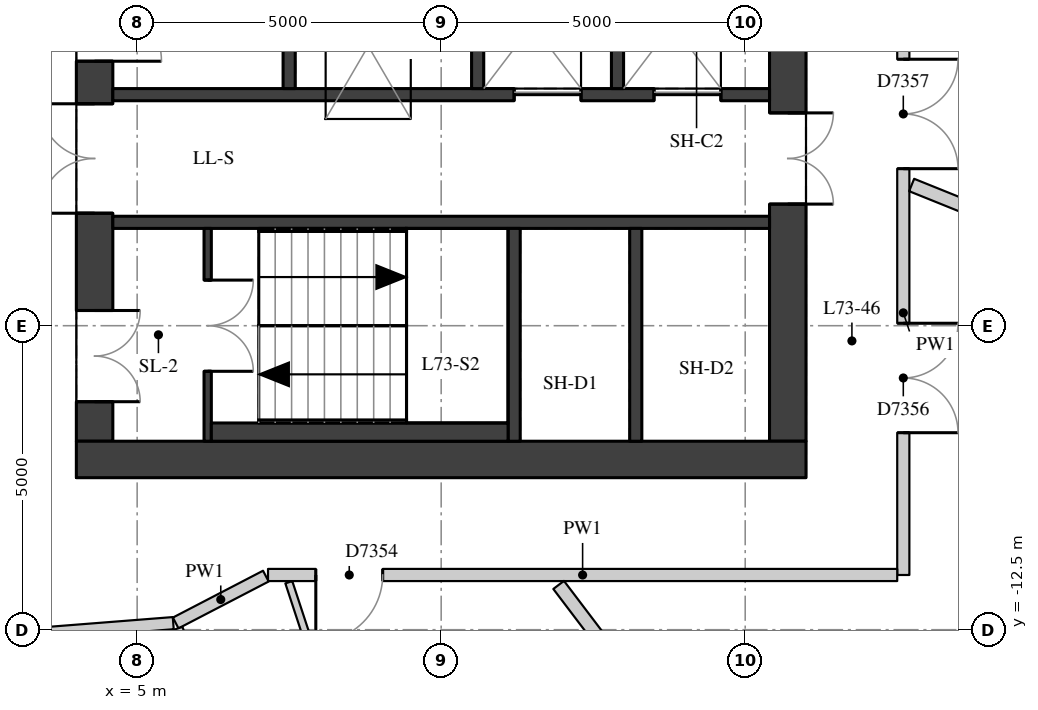
"""IFC4 building model, lengths in metres.
Left out: names, types, materials, properties, quantities, classifications, styles, units other than length and angle.
Written with IfcOpenShell. Run it as: python <this file> out.ifc"""

import sys

from ifc_helpers import new_model, si_unit, direction, frame, frame_2d, origin, place, context, subcontext, project, spatial, rectangle, extrude, element, fill, save


model = new_model("IFC4")
c1 = context("Model", 3, precision=1e-05, world=origin(), true_north=direction((0.0, 1.0)))
c2 = subcontext(c1, "Body", "Model", "MODEL_VIEW")
j1 = project(units=[si_unit("LENGTHUNIT", "METRE"), si_unit("PLANEANGLEUNIT", "RADIAN")], contexts=[c1])
p1 = place(None, origin())
s1 = spatial("IfcSite", under=j1, at=p1, CompositionType="ELEMENT")
p2 = place(p1, origin())
s2 = spatial("IfcBuilding", under=s1, at=p2, CompositionType="ELEMENT")
p3 = place(p2, frame((0.0, 0.0, 256.4)))
s3 = spatial("IfcBuildingStorey", under=s2, at=p3, CompositionType="ELEMENT", Elevation=256.4)
p4 = place(p3, frame((4.3, -9.4, 0.0), z_axis=(0.0, 0.0, 1.0), x_axis=(0.0, 1.0, 0.0)))
e1 = element("IfcWall", 1, at=p4, inside=s3, PredefinedType="SHEAR", context=c2, shape_type="SweptSolid", body=[
    extrude(rectangle(XDim=18.8, YDim=0.6, at=frame_2d((9.4, 0.0))), origin(), (0.0, 0.0, 1.0), 2.95),
])
p5 = place(p4, frame((0.65, 0.0, 0.0)))
e2 = element("IfcOpeningElement", 2, at=p5, cuts=e1, PredefinedType="OPENING", context=c2, shape_type="SweptSolid", body=[
    extrude(rectangle(XDim=1.5, YDim=2.1, at=frame_2d((0.75, 1.05))), frame((0.0, 0.31, 0.0), z_axis=(0.0, -1.0, 0.0), x_axis=(1.0, 0.0, 0.0)), (0.0, 0.0, 1.0), 0.62),
])
p6 = place(p4, frame((3.75, 0.0, 0.0)))
e3 = element("IfcOpeningElement", 3, at=p6, cuts=e1, PredefinedType="OPENING", context=c2, shape_type="SweptSolid", body=[
    extrude(rectangle(XDim=1.8, YDim=2.1, at=frame_2d((0.9, 1.05))), frame((0.0, 0.31, 0.0), z_axis=(0.0, -1.0, 0.0), x_axis=(1.0, 0.0, 0.0)), (0.0, 0.0, 1.0), 0.62),
])
p7 = place(p4, frame((6.25, 0.0, 0.0)))
e4 = element("IfcOpeningElement", 4, at=p7, cuts=e1, PredefinedType="OPENING", context=c2, shape_type="SweptSolid", body=[
    extrude(rectangle(XDim=1.1, YDim=2.1, at=frame_2d((0.55, 1.05))), frame((0.0, 0.31, 0.0), z_axis=(0.0, -1.0, 0.0), x_axis=(1.0, 0.0, 0.0)), (0.0, 0.0, 1.0), 0.62),
])
p8 = place(p4, frame((8.9, 0.0, 0.0)))
e5 = element("IfcOpeningElement", 5, at=p8, cuts=e1, PredefinedType="OPENING", context=c2, shape_type="SweptSolid", body=[
    extrude(rectangle(XDim=1.0, YDim=2.1, at=frame_2d((0.5, 1.05))), frame((0.0, 0.31, 0.0), z_axis=(0.0, -1.0, 0.0), x_axis=(1.0, 0.0, 0.0)), (0.0, 0.0, 1.0), 0.62),
])
p9 = place(p4, frame((11.45, 0.0, 0.0)))
e6 = element("IfcOpeningElement", 6, at=p9, cuts=e1, PredefinedType="OPENING", context=c2, shape_type="SweptSolid", body=[
    extrude(rectangle(XDim=1.1, YDim=2.1, at=frame_2d((0.55, 1.05))), frame((0.0, 0.31, 0.0), z_axis=(0.0, -1.0, 0.0), x_axis=(1.0, 0.0, 0.0)), (0.0, 0.0, 1.0), 0.62),
])
p10 = place(p4, frame((13.25, 0.0, 0.0)))
e7 = element("IfcOpeningElement", 7, at=p10, cuts=e1, PredefinedType="OPENING", context=c2, shape_type="SweptSolid", body=[
    extrude(rectangle(XDim=1.8, YDim=2.1, at=frame_2d((0.9, 1.05))), frame((0.0, 0.31, 0.0), z_axis=(0.0, -1.0, 0.0), x_axis=(1.0, 0.0, 0.0)), (0.0, 0.0, 1.0), 0.62),
])
p11 = place(p4, frame((16.65, 0.0, 0.0)))
e8 = element("IfcOpeningElement", 8, at=p11, cuts=e1, PredefinedType="OPENING", context=c2, shape_type="SweptSolid", body=[
    extrude(rectangle(XDim=1.5, YDim=2.1, at=frame_2d((0.75, 1.05))), frame((0.0, 0.31, 0.0), z_axis=(0.0, -1.0, 0.0), x_axis=(1.0, 0.0, 0.0)), (0.0, 0.0, 1.0), 0.62),
])
p12 = place(p3, frame((15.7, -9.4, 0.0), z_axis=(0.0, 0.0, 1.0), x_axis=(0.0, 1.0, 0.0)))
e9 = element("IfcWall", 9, at=p12, inside=s3, PredefinedType="SHEAR", context=c2, shape_type="SweptSolid", body=[
    extrude(rectangle(XDim=18.8, YDim=0.6, at=frame_2d((9.4, 0.0))), origin(), (0.0, 0.0, 1.0), 2.95),
])
p13 = place(p12, frame((13.4, 0.0, 0.0)))
e10 = element("IfcOpeningElement", 10, at=p13, cuts=e9, PredefinedType="OPENING", context=c2, shape_type="SweptSolid", body=[
    extrude(rectangle(XDim=1.5, YDim=2.1, at=frame_2d((0.75, 1.05))), frame((0.0, 0.31, 0.0), z_axis=(0.0, -1.0, 0.0), x_axis=(1.0, 0.0, 0.0)), (0.0, 0.0, 1.0), 0.62),
])
p14 = place(p12, frame((3.9, 0.0, 0.0)))
e11 = element("IfcOpeningElement", 11, at=p14, cuts=e9, PredefinedType="OPENING", context=c2, shape_type="SweptSolid", body=[
    extrude(rectangle(XDim=1.5, YDim=2.1, at=frame_2d((0.75, 1.05))), frame((0.0, 0.31, 0.0), z_axis=(0.0, -1.0, 0.0), x_axis=(1.0, 0.0, 0.0)), (0.0, 0.0, 1.0), 0.62),
])
p15 = place(p3, frame((4.0, -9.7, 0.0), z_axis=(0.0, 0.0, 1.0), x_axis=(1.0, 0.0, 0.0)))
e12 = element("IfcWall", 12, at=p15, inside=s3, PredefinedType="SHEAR", context=c2, shape_type="SweptSolid", body=[
    extrude(rectangle(XDim=12.0, YDim=0.6, at=frame_2d((6.0, 0.0))), origin(), (0.0, 0.0, 1.0), 2.95),
])
p16 = place(p3, frame((4.6, -3.7, 0.0), z_axis=(0.0, 0.0, 1.0), x_axis=(1.0, 0.0, 0.0)))
e13 = element("IfcWall", 13, at=p16, inside=s3, PredefinedType="SHEAR", context=c2, shape_type="SweptSolid", body=[
    extrude(rectangle(XDim=10.8, YDim=0.2, at=frame_2d((5.4, 0.0))), origin(), (0.0, 0.0, 1.0), 2.95),
])
p17 = place(p16, frame((6.6, 0.0, 0.0)))
e14 = element("IfcOpeningElement", 14, at=p17, cuts=e13, PredefinedType="OPENING", context=c2, shape_type="SweptSolid", body=[
    extrude(rectangle(XDim=1.1, YDim=2.1, at=frame_2d((0.55, 1.05))), frame((0.0, 0.11, 0.0), z_axis=(0.0, -1.0, 0.0), x_axis=(1.0, 0.0, 0.0)), (0.0, 0.0, 1.0), 0.22),
])
p18 = place(p16, frame((8.9, 0.0, 0.0)))
e15 = element("IfcOpeningElement", 15, at=p18, cuts=e13, PredefinedType="OPENING", context=c2, shape_type="SweptSolid", body=[
    extrude(rectangle(XDim=1.1, YDim=2.1, at=frame_2d((0.55, 1.05))), frame((0.0, 0.11, 0.0), z_axis=(0.0, -1.0, 0.0), x_axis=(1.0, 0.0, 0.0)), (0.0, 0.0, 1.0), 0.22),
])
p19 = place(p3, frame((4.6, -5.8, 0.0), z_axis=(0.0, 0.0, 1.0), x_axis=(1.0, 0.0, 0.0)))
e16 = element("IfcWall", 16, at=p19, inside=s3, PredefinedType="SHEAR", context=c2, shape_type="SweptSolid", body=[
    extrude(rectangle(XDim=10.8, YDim=0.2, at=frame_2d((5.4, 0.0))), origin(), (0.0, 0.0, 1.0), 2.95),
])
for number, where, z_axis, x_axis in (
    (17, (11.2, -9.4, 0.0), (0.0, 0.0, 1.0), (0.0, 1.0, 0.0)),
    (18, (13.2, -9.4, 0.0), (0.0, 0.0, 1.0), (0.0, 1.0, 0.0)),
):
    element("IfcWall", number, at=place(p3, frame(where, z_axis=z_axis, x_axis=x_axis)), inside=s3, PredefinedType="SHEAR", context=c2, shape_type="SweptSolid", body=[
        extrude(rectangle(XDim=3.5, YDim=0.2, at=frame_2d((1.75, 0.0))), origin(), (0.0, 0.0, 1.0), 2.95),
    ])
p20 = place(p3, frame((7.5, -3.6, 0.0), z_axis=(0.0, 0.0, 1.0), x_axis=(0.0, 1.0, 0.0)))
e19 = element("IfcWall", 19, at=p20, inside=s3, PredefinedType="SHEAR", context=c2, shape_type="SweptSolid", body=[
    extrude(rectangle(XDim=2.5, YDim=0.2, at=frame_2d((1.25, 0.0))), origin(), (0.0, 0.0, 1.0), 2.95),
])
p21 = place(p20, frame((0.7, 0.0, 0.0)))
e20 = element("IfcOpeningElement", 20, at=p21, cuts=e19, PredefinedType="OPENING", context=c2, shape_type="SweptSolid", body=[
    extrude(rectangle(XDim=1.1, YDim=2.1, at=frame_2d((0.55, 1.05))), frame((0.0, 0.11, 0.0), z_axis=(0.0, -1.0, 0.0), x_axis=(1.0, 0.0, 0.0)), (0.0, 0.0, 1.0), 0.22),
])
for number, where, z_axis, x_axis in (
    (21, (10.6, -3.6, 0.0), (0.0, 0.0, 1.0), (0.0, 1.0, 0.0)),
    (22, (12.9, -3.6, 0.0), (0.0, 0.0, 1.0), (0.0, 1.0, 0.0)),
):
    element("IfcWall", number, at=place(p3, frame(where, z_axis=z_axis, x_axis=x_axis)), inside=s3, PredefinedType="SHEAR", context=c2, shape_type="SweptSolid", body=[
        extrude(rectangle(XDim=2.5, YDim=0.2, at=frame_2d((1.25, 0.0))), origin(), (0.0, 0.0, 1.0), 2.95),
    ])
p22 = place(p3, frame((6.16, -9.4, 0.0), z_axis=(0.0, 0.0, 1.0), x_axis=(0.0, 1.0, 0.0)))
e23 = element("IfcWall", 23, at=p22, inside=s3, PredefinedType="SHEAR", context=c2, shape_type="SweptSolid", body=[
    extrude(rectangle(XDim=3.5, YDim=0.12, at=frame_2d((1.75, 0.0))), origin(), (0.0, 0.0, 1.0), 2.95),
])
p23 = place(p22, frame((1.15, 0.0, 0.0)))
e24 = element("IfcOpeningElement", 24, at=p23, cuts=e23, PredefinedType="OPENING", context=c2, shape_type="SweptSolid", body=[
    extrude(rectangle(XDim=1.5, YDim=2.1, at=frame_2d((0.75, 1.05))), frame((0.0, 0.07, 0.0), z_axis=(0.0, -1.0, 0.0), x_axis=(1.0, 0.0, 0.0)), (0.0, 0.0, 1.0), 0.14),
])
p24 = place(p3, frame((6.22, -9.25, 0.0), z_axis=(0.0, 0.0, 1.0), x_axis=(1.0, 0.0, 0.0)))
e25 = element("IfcWall", 25, at=p24, inside=s3, PredefinedType="PARTITIONING", context=c2, shape_type="SweptSolid", body=[
    extrude(rectangle(XDim=4.88, YDim=0.3, at=frame_2d((2.44, 0.0))), origin(), (0.0, 0.0, 1.0), 2.95),
])
p25 = place(p3, frame((17.6, -2.977, 0.0), z_axis=(0.0, 0.0, 1.0), x_axis=(0.0, -1.0, 0.0)))
e26 = element("IfcWall", 26, at=p25, inside=s3, PredefinedType="PARTITIONING", context=c2, shape_type="SweptSolid", body=[
    extrude(rectangle(XDim=8.623, YDim=0.2, at=frame_2d((4.312, 0.0))), origin(), (0.0, 0.0, 1.0), 2.95),
])
p26 = place(p25, frame((4.483, 0.0, 0.0)))
e27 = element("IfcOpeningElement", 27, at=p26, cuts=e26, PredefinedType="OPENING", context=c2, shape_type="SweptSolid", body=[
    extrude(rectangle(XDim=1.8, YDim=2.1, at=frame_2d((0.9, 1.05))), frame((0.0, 0.11, 0.0), z_axis=(0.0, -1.0, 0.0), x_axis=(1.0, 0.0, 0.0)), (0.0, 0.0, 1.0), 0.22),
])
p27 = place(p25, frame((0.14, 0.0, 0.0)))
e28 = element("IfcOpeningElement", 28, at=p27, cuts=e26, PredefinedType="OPENING", context=c2, shape_type="SweptSolid", body=[
    extrude(rectangle(XDim=1.8, YDim=2.1, at=frame_2d((0.9, 1.05))), frame((0.0, 0.11, 0.0), z_axis=(0.0, -1.0, 0.0), x_axis=(1.0, 0.0, 0.0)), (0.0, 0.0, 1.0), 0.22),
])
p28 = place(p3, frame((17.5, -11.6, 0.0), z_axis=(0.0, 0.0, 1.0), x_axis=(-1.0, 0.0, 0.0)))
e29 = element("IfcWall", 29, at=p28, inside=s3, PredefinedType="PARTITIONING", context=c2, shape_type="SweptSolid", body=[
    extrude(rectangle(XDim=10.348, YDim=0.2, at=frame_2d((5.174, 0.0))), origin(), (0.0, 0.0, 1.0), 2.95),
])
p29 = place(p28, frame((8.462, 0.0, 0.0)))
e30 = element("IfcOpeningElement", 30, at=p29, cuts=e29, PredefinedType="OPENING", context=c2, shape_type="SweptSolid", body=[
    extrude(rectangle(XDim=1.1, YDim=2.1, at=frame_2d((0.55, 1.05))), frame((0.0, 0.11, 0.0), z_axis=(0.0, -1.0, 0.0), x_axis=(1.0, 0.0, 0.0)), (0.0, 0.0, 1.0), 0.22),
])
p30 = place(p3, frame((7.116, -11.619, 0.0), z_axis=(0.0, 0.0, 1.0), x_axis=(-0.88733399288, -0.461127298128, 0.0)))
e31 = element("IfcWall", 31, at=p30, inside=s3, PredefinedType="PARTITIONING", context=c2, shape_type="SweptSolid", body=[
    extrude(rectangle(XDim=1.671, YDim=0.2, at=frame_2d((0.835, 0.0))), origin(), (0.0, 0.0, 1.0), 2.95),
])
p31 = place(p3, frame((5.594, -12.392, 0.0), z_axis=(0.0, 0.0, 1.0), x_axis=(-0.996925151721, -0.078359695423, 0.0)))
e32 = element("IfcWall", 32, at=p31, inside=s3, PredefinedType="PARTITIONING", context=c2, shape_type="SweptSolid", body=[
    extrude(rectangle(XDim=8.643, YDim=0.2, at=frame_2d((4.321, 0.0))), origin(), (0.0, 0.0, 1.0), 2.95),
])
p32 = place(p31, frame((6.722, 0.0, 0.0)))
e33 = element("IfcOpeningElement", 33, at=p32, cuts=e32, PredefinedType="OPENING", context=c2, shape_type="SweptSolid", body=[
    extrude(rectangle(XDim=0.9, YDim=2.1, at=frame_2d((0.45, 1.05))), frame((0.0, 0.11, 0.0), z_axis=(0.0, -1.0, 0.0), x_axis=(1.0, 0.0, 0.0)), (0.0, 0.0, 1.0), 0.22),
])
p33 = place(p31, frame((2.309, 0.0, 0.0)))
e34 = element("IfcOpeningElement", 34, at=p33, cuts=e32, PredefinedType="OPENING", context=c2, shape_type="SweptSolid", body=[
    extrude(rectangle(XDim=1.1, YDim=2.1, at=frame_2d((0.55, 1.05))), frame((0.0, 0.11, 0.0), z_axis=(0.0, -1.0, 0.0), x_axis=(1.0, 0.0, 0.0)), (0.0, 0.0, 1.0), 0.22),
])
p34 = place(p3, frame((7.891, -19.332, 0.0), z_axis=(0.0, 0.0, 1.0), x_axis=(-0.31230054546, 0.94998335212, 0.0)))
e35 = element("IfcWall", 35, at=p34, inside=s3, PredefinedType="PARTITIONING", context=c2, shape_type="SweptSolid", body=[
    extrude(rectangle(XDim=7.204, YDim=0.22, at=frame_2d((3.602, 0.0))), origin(), (0.0, 0.0, 1.0), 2.95),
])
p35 = place(p3, frame((14.906, -15.687, 0.0), z_axis=(0.0, 0.0, 1.0), x_axis=(-0.604078206052, 0.796925041, 0.0)))
e36 = element("IfcWall", 36, at=p35, inside=s3, PredefinedType="PARTITIONING", context=c2, shape_type="SweptSolid", body=[
    extrude(rectangle(XDim=4.923, YDim=0.22, at=frame_2d((2.462, 0.0))), origin(), (0.0, 0.0, 1.0), 2.95),
])
p36 = place(p3, frame((21.804, -6.824, 0.0), z_axis=(0.0, 0.0, 1.0), x_axis=(-0.927528978592, 0.373751245981, 0.0)))
e37 = element("IfcWall", 37, at=p36, inside=s3, PredefinedType="PARTITIONING", context=c2, shape_type="SweptSolid", body=[
    extrude(rectangle(XDim=4.384, YDim=0.22, at=frame_2d((2.192, 0.0))), origin(), (0.0, 0.0, 1.0), 2.95),
])
p37 = place(p3, frame((7.494, -11.719, 0.0), z_axis=(0.0, 0.0, 1.0), x_axis=(0.312267061004, -0.949994359253, 0.0)))
e38 = element("IfcWall", 38, at=p37, inside=s3, PredefinedType="PARTITIONING", context=c2, shape_type="SweptSolid", body=[
    extrude(rectangle(XDim=2.85, YDim=0.12, at=frame_2d((1.425, 0.0))), origin(), (0.0, 0.0, 1.0), 2.95),
])
p38 = place(p5, origin())
e39 = element("IfcDoor", 39, at=p38, inside=s3, OperationType="DOUBLE_DOOR_SINGLE_SWING", PredefinedType="DOOR", context=c2, shape_type="SweptSolid", body=[
    extrude(rectangle(XDim=1.5, YDim=2.1, at=frame_2d((0.75, 1.05))), frame((0.0, 0.025, 0.0), z_axis=(0.0, -1.0, 0.0), x_axis=(1.0, 0.0, 0.0)), (0.0, 0.0, 1.0), 0.05),
])
fill(e2, e39)
p39 = place(p6, origin())
e40 = element("IfcDoor", 40, at=p39, inside=s3, OperationType="DOUBLE_DOOR_SINGLE_SWING", PredefinedType="DOOR", context=c2, shape_type="SweptSolid", body=[
    extrude(rectangle(XDim=1.8, YDim=2.1, at=frame_2d((0.9, 1.05))), frame((0.0, 0.025, 0.0), z_axis=(0.0, -1.0, 0.0), x_axis=(1.0, 0.0, 0.0)), (0.0, 0.0, 1.0), 0.05),
])
fill(e3, e40)
p40 = place(p7, origin())
e41 = element("IfcDoor", 41, at=p40, inside=s3, OperationType="SINGLE_SWING_RIGHT", PredefinedType="DOOR", context=c2, shape_type="SweptSolid", body=[
    extrude(rectangle(XDim=1.1, YDim=2.1, at=frame_2d((0.55, 1.05))), frame((0.0, 0.025, 0.0), z_axis=(0.0, -1.0, 0.0), x_axis=(1.0, 0.0, 0.0)), (0.0, 0.0, 1.0), 0.05),
])
fill(e4, e41)
p41 = place(p14, origin())
e42 = element("IfcDoor", 42, at=p41, inside=s3, OperationType="DOUBLE_DOOR_SINGLE_SWING", PredefinedType="DOOR", context=c2, shape_type="SweptSolid", body=[
    extrude(rectangle(XDim=1.5, YDim=2.1, at=frame_2d((0.75, 1.05))), frame((0.0, 0.025, 0.0), z_axis=(0.0, -1.0, 0.0), x_axis=(1.0, 0.0, 0.0)), (0.0, 0.0, 1.0), 0.05),
])
fill(e11, e42)
p42 = place(p23, origin())
e43 = element("IfcDoor", 43, at=p42, inside=s3, OperationType="DOUBLE_DOOR_SINGLE_SWING", PredefinedType="DOOR", context=c2, shape_type="SweptSolid", body=[
    extrude(rectangle(XDim=1.5, YDim=2.1, at=frame_2d((0.75, 1.05))), frame((0.0, 0.025, 0.0), z_axis=(0.0, -1.0, 0.0), x_axis=(1.0, 0.0, 0.0)), (0.0, 0.0, 1.0), 0.05),
])
fill(e24, e43)
p43 = place(p17, origin())
e44 = element("IfcDoor", 44, at=p43, inside=s3, OperationType="DOUBLE_DOOR_SLIDING", PredefinedType="DOOR", context=c2, shape_type="SweptSolid", body=[
    extrude(rectangle(XDim=1.1, YDim=2.1, at=frame_2d((0.55, 1.05))), frame((0.0, 0.025, 0.0), z_axis=(0.0, -1.0, 0.0), x_axis=(1.0, 0.0, 0.0)), (0.0, 0.0, 1.0), 0.05),
])
fill(e14, e44)
p44 = place(p18, origin())
e45 = element("IfcDoor", 45, at=p44, inside=s3, OperationType="DOUBLE_DOOR_SLIDING", PredefinedType="DOOR", context=c2, shape_type="SweptSolid", body=[
    extrude(rectangle(XDim=1.1, YDim=2.1, at=frame_2d((0.55, 1.05))), frame((0.0, 0.025, 0.0), z_axis=(0.0, -1.0, 0.0), x_axis=(1.0, 0.0, 0.0)), (0.0, 0.0, 1.0), 0.05),
])
fill(e15, e45)
p45 = place(p29, origin())
e46 = element("IfcDoor", 46, at=p45, inside=s3, OperationType="SINGLE_SWING_RIGHT", PredefinedType="DOOR", context=c2, shape_type="SweptSolid", body=[
    extrude(rectangle(XDim=1.1, YDim=2.1, at=frame_2d((0.55, 1.05))), frame((0.0, 0.025, 0.0), z_axis=(0.0, -1.0, 0.0), x_axis=(1.0, 0.0, 0.0)), (0.0, 0.0, 1.0), 0.05),
])
fill(e30, e46)
p46 = place(p26, origin())
e47 = element("IfcDoor", 47, at=p46, inside=s3, OperationType="DOUBLE_DOOR_SINGLE_SWING", PredefinedType="DOOR", context=c2, shape_type="SweptSolid", body=[
    extrude(rectangle(XDim=1.8, YDim=2.1, at=frame_2d((0.9, 1.05))), frame((0.0, 0.025, 0.0), z_axis=(0.0, -1.0, 0.0), x_axis=(1.0, 0.0, 0.0)), (0.0, 0.0, 1.0), 0.05),
])
fill(e27, e47)
p47 = place(p27, origin())
e48 = element("IfcDoor", 48, at=p47, inside=s3, OperationType="DOUBLE_DOOR_SINGLE_SWING", PredefinedType="DOOR", context=c2, shape_type="SweptSolid", body=[
    extrude(rectangle(XDim=1.8, YDim=2.1, at=frame_2d((0.9, 1.05))), frame((0.0, 0.025, 0.0), z_axis=(0.0, -1.0, 0.0), x_axis=(1.0, 0.0, 0.0)), (0.0, 0.0, 1.0), 0.05),
])
fill(e28, e48)
save(model, sys.argv[1])
